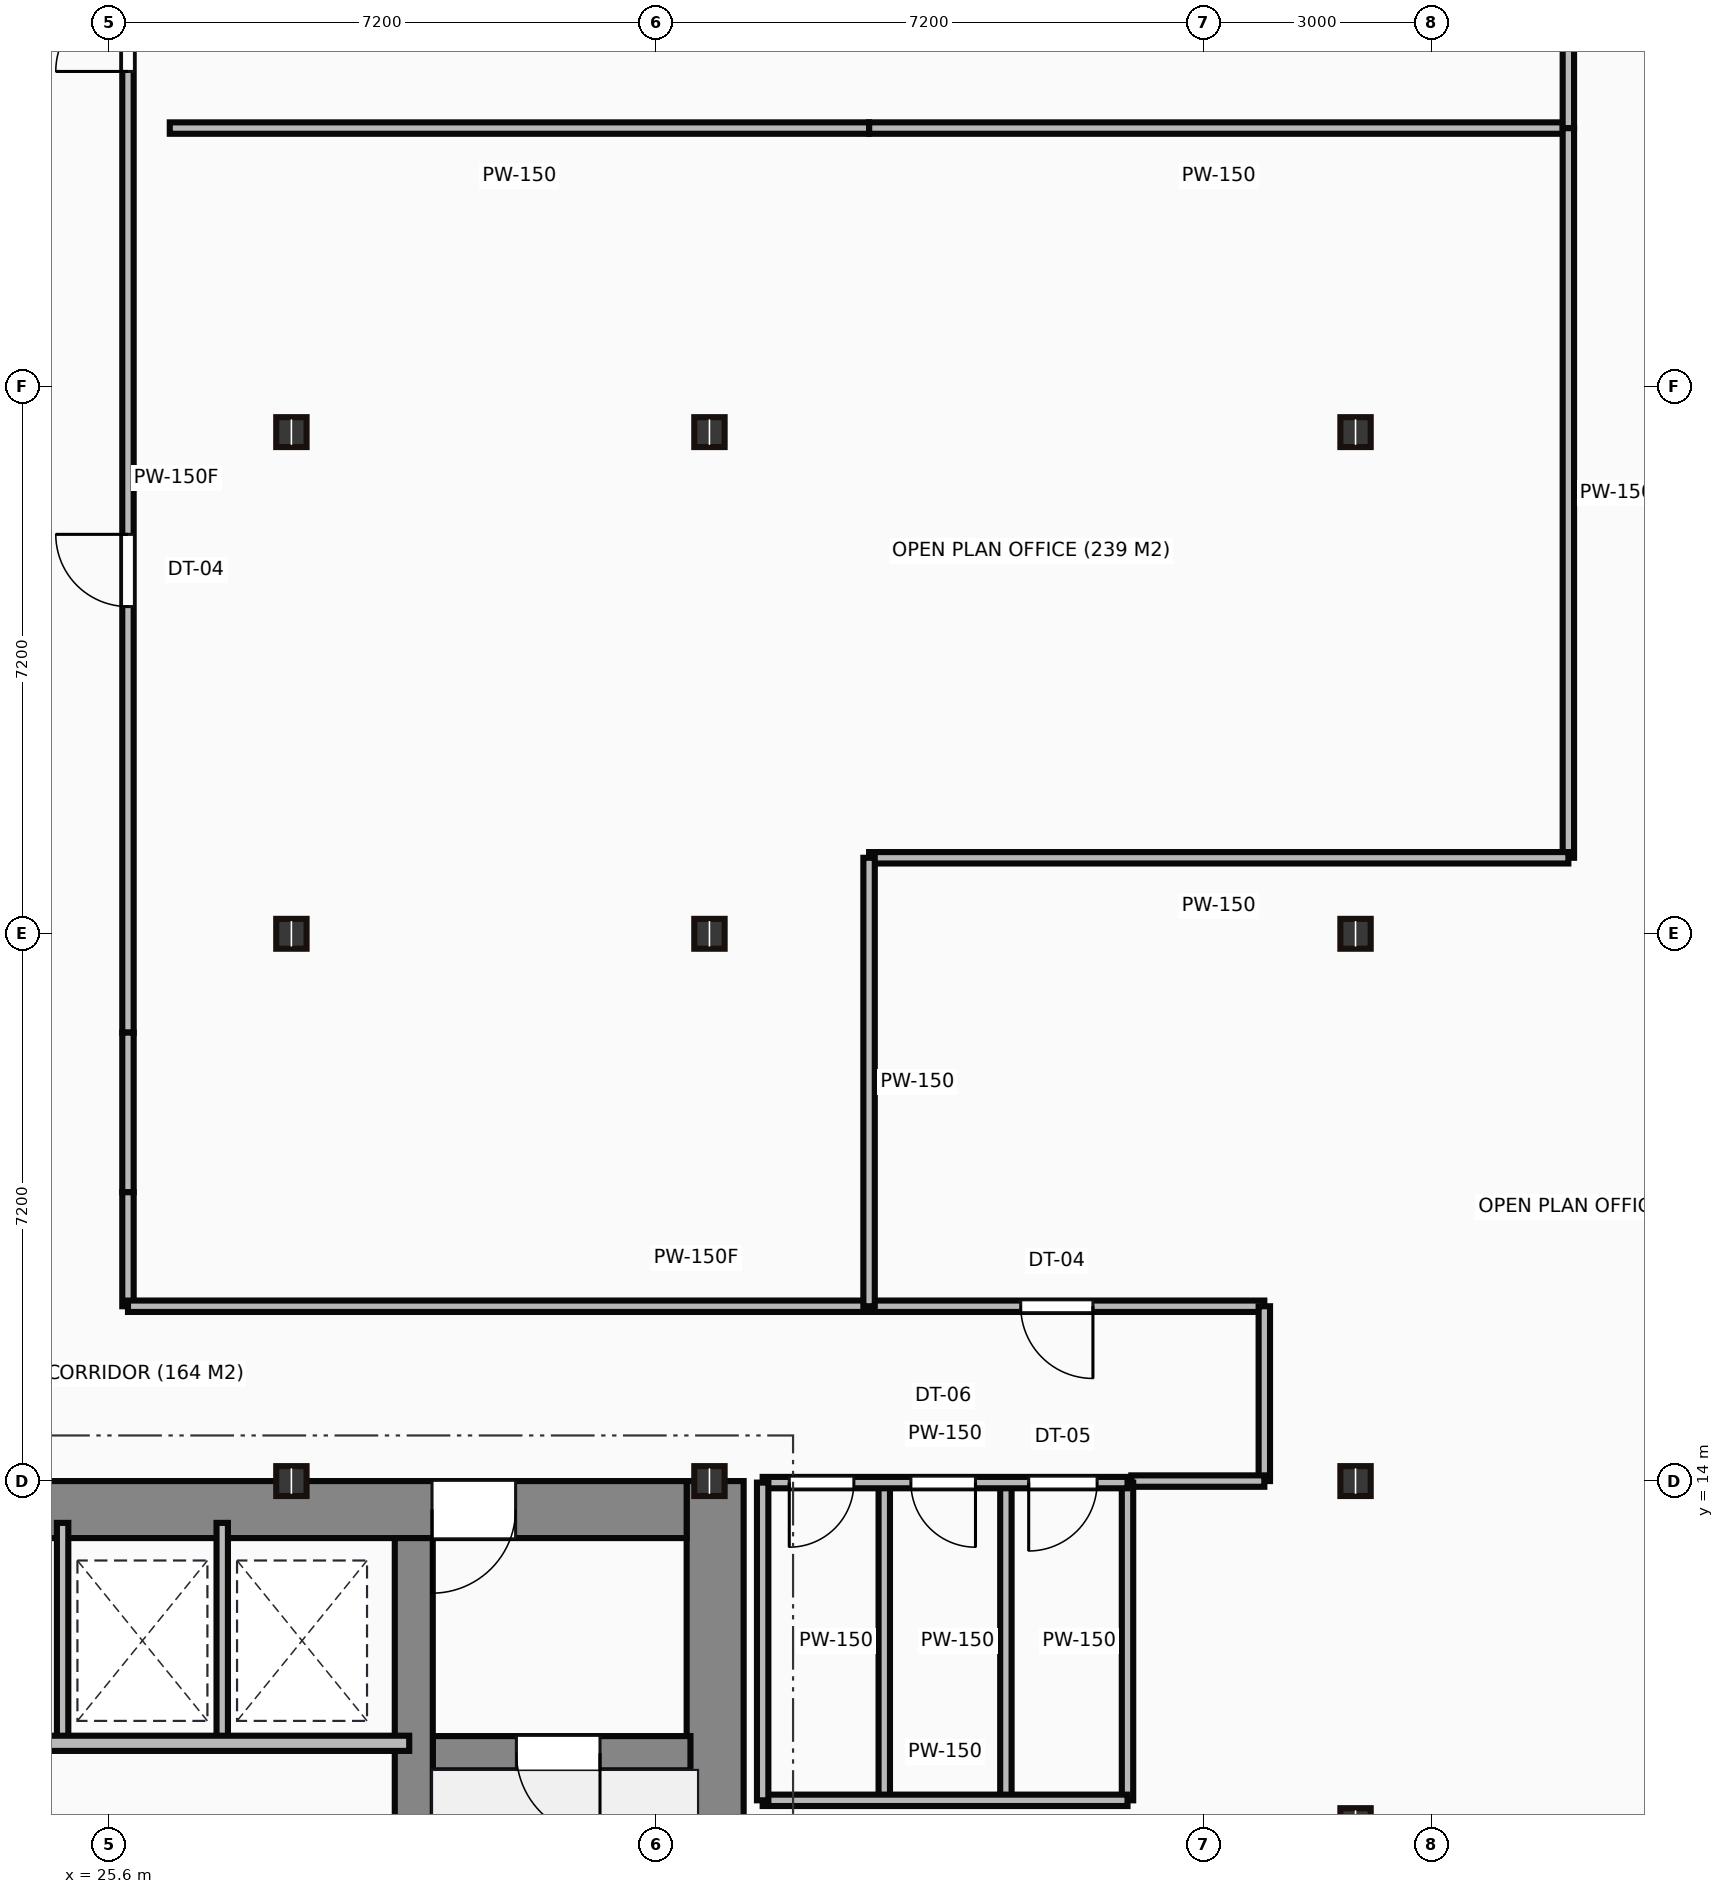
"""IFC4 building model, lengths in metres.
Left out: names, types, materials, properties, quantities, classifications, styles, units other than length and angle.
Written with IfcOpenShell. Run it as: python <this file> out.ifc"""

import sys

from ifc_helpers import new_model, si_unit, direction, frame, frame_2d, origin, origin_2d, place, context, subcontext, project, spatial, rectangle, i_section, extrude, source, transform, mapped, element, fill, save


model = new_model("IFC4")
c1 = context("Model", 3, precision=1e-05, world=origin(), true_north=direction((0.0, 1.0)))
c2 = subcontext(c1, "Body", "Model", "MODEL_VIEW")
j1 = project(units=[si_unit("LENGTHUNIT", "METRE"), si_unit("PLANEANGLEUNIT", "RADIAN")], contexts=[c1])
p1 = place(None, origin())
s1 = spatial("IfcSite", under=j1, at=p1, CompositionType="ELEMENT")
p2 = place(p1, origin())
s2 = spatial("IfcBuilding", under=s1, at=p2, CompositionType="ELEMENT")
p3 = place(p2, frame((0.0, 0.0, 114.2)))
s3 = spatial("IfcBuildingStorey", under=s2, at=p3, CompositionType="ELEMENT", Elevation=114.2)
m1 = source(origin(), c2, "Body", "SweptSolid", [
    extrude(rectangle(XDim=13.1, YDim=0.75, at=frame_2d((6.55, 0.0))), origin(), (0.0, 0.0, 1.0), 3.65),
])
p4 = place(p3, frame((33.575, 0.9, 0.0), z_axis=(0.0, 0.0, 1.0), x_axis=(0.0, 1.0, 0.0)))
e1 = element("IfcWall", 1, at=p4, inside=s3, PredefinedType="SHEAR", context=c2, shape_type="MappedRepresentation", body=[
    mapped(m1, transform((0.0, 0.0, 0.0))),
])
m2 = source(origin(), c2, "Body", "SweptSolid", [
    extrude(rectangle(XDim=12.6, YDim=0.75, at=frame_2d((6.3, 0.0))), origin(), (0.0, 0.0, 1.0), 3.65),
])
p5 = place(p3, frame((20.6, 13.625, 0.0), z_axis=(0.0, 0.0, 1.0), x_axis=(1.0, 0.0, 0.0)))
e2 = element("IfcWall", 2, at=p5, inside=s3, PredefinedType="SHEAR", context=c2, shape_type="MappedRepresentation", body=[
    mapped(m2, transform((0.0, 0.0, 0.0))),
])
p6 = place(p5, frame((9.25, 0.0, 0.0)))
e3 = element("IfcOpeningElement", 3, at=p6, cuts=e2, PredefinedType="OPENING", context=c2, shape_type="SweptSolid", body=[
    extrude(rectangle(XDim=1.1, YDim=2.15, at=frame_2d((0.55, 1.075))), frame((0.0, 0.385, 0.0), z_axis=(0.0, -1.0, 0.0), x_axis=(1.0, 0.0, 0.0)), (0.0, 0.0, 1.0), 0.77),
])
m3 = source(origin(), c2, "Body", "SweptSolid", [
    extrude(rectangle(XDim=12.35, YDim=0.5, at=frame_2d((6.175, 0.0))), origin(), (0.0, 0.0, 1.0), 3.65),
])
p7 = place(p3, frame((29.61, 0.9, 0.0), z_axis=(0.0, 0.0, 1.0), x_axis=(0.0, 1.0, 0.0)))
e4 = element("IfcWall", 4, at=p7, inside=s3, PredefinedType="SHEAR", context=c2, shape_type="MappedRepresentation", body=[
    mapped(m3, transform((0.0, 0.0, 0.0))),
])
m4 = source(origin(), c2, "Body", "SweptSolid", [
    extrude(rectangle(XDim=3.39, YDim=0.45, at=frame_2d((1.695, 0.0))), origin(), (0.0, 0.0, 1.0), 3.65),
])
p8 = place(p3, frame((29.86, 10.42, 0.0), z_axis=(0.0, 0.0, 1.0), x_axis=(1.0, 0.0, 0.0)))
e5 = element("IfcWall", 5, at=p8, inside=s3, PredefinedType="SHEAR", context=c2, shape_type="MappedRepresentation", body=[
    mapped(m4, transform((0.0, 0.0, 0.0))),
])
p9 = place(p8, frame((1.1, 0.0, 0.0)))
e6 = element("IfcOpeningElement", 6, at=p9, cuts=e5, PredefinedType="OPENING", context=c2, shape_type="SweptSolid", body=[
    extrude(rectangle(XDim=1.1, YDim=2.15, at=frame_2d((0.55, 1.075))), frame((0.0, 0.235, 0.0), z_axis=(0.0, -1.0, 0.0), x_axis=(1.0, 0.0, 0.0)), (0.0, 0.0, 1.0), 0.47),
])
m5 = source(origin(), c2, "Body", "SweptSolid", [
    extrude(i_section(OverallWidth=0.399, OverallDepth=0.393, WebThickness=0.023, FlangeThickness=0.037, at=origin_2d()), origin(), (0.0, 0.0, 1.0), 3.65),
])
for number, where, z_axis, x_axis in (
    (7, (28.0, 14.0, 0.0), (0.0, 0.0, 1.0), (1.0, 0.0, 0.0)),
    (8, (28.0, 21.2, 0.0), (0.0, 0.0, 1.0), (1.0, 0.0, 0.0)),
    (9, (28.0, 27.8, 0.0), (0.0, 0.0, 1.0), (1.0, 0.0, 0.0)),
    (10, (33.5, 14.0, 0.0), (0.0, 0.0, 1.0), (1.0, 0.0, 0.0)),
    (11, (33.5, 21.2, 0.0), (0.0, 0.0, 1.0), (1.0, 0.0, 0.0)),
    (12, (33.5, 27.8, 0.0), (0.0, 0.0, 1.0), (1.0, 0.0, 0.0)),
    (13, (42.0, 9.5, 0.0), (0.0, 0.0, 1.0), (1.0, 0.0, 0.0)),
    (14, (42.0, 14.0, 0.0), (0.0, 0.0, 1.0), (1.0, 0.0, 0.0)),
    (15, (42.0, 21.2, 0.0), (0.0, 0.0, 1.0), (1.0, 0.0, 0.0)),
    (16, (42.0, 27.8, 0.0), (0.0, 0.0, 1.0), (1.0, 0.0, 0.0)),
):
    element("IfcColumn", number, at=place(p3, frame(where, z_axis=z_axis, x_axis=x_axis)), inside=s3, PredefinedType="COLUMN", context=c2, shape_type="MappedRepresentation", body=[
        mapped(m5, transform((0.0, 0.0, 0.0))),
    ])
m6 = source(origin(), c2, "Body", "SweptSolid", [
    extrude(rectangle(XDim=8.8, YDim=0.2, at=frame_2d((4.4, 0.0))), origin(), (0.0, 0.0, 1.0), 3.4),
])
p10 = place(p3, frame((20.75, 10.55, 0.0), z_axis=(0.0, 0.0, 1.0), x_axis=(1.0, 0.0, 0.0)))
e17 = element("IfcWall", 17, at=p10, inside=s3, PredefinedType="PARTITIONING", context=c2, shape_type="MappedRepresentation", body=[
    mapped(m6, transform((0.0, 0.0, 0.0))),
])
m7 = source(origin(), c2, "Body", "SweptSolid", [
    extrude(rectangle(XDim=2.85, YDim=0.15, at=frame_2d((1.425, 0.0))), origin(), (0.0, 0.0, 1.0), 3.4),
])
for number, where, z_axis, x_axis in (
    (18, (24.99, 10.6, 0.0), (0.0, 0.0, 1.0), (0.0, 1.0, 0.0)),
    (19, (27.09, 10.6, 0.0), (0.0, 0.0, 1.0), (0.0, 1.0, 0.0)),
):
    element("IfcWall", number, at=place(p3, frame(where, z_axis=z_axis, x_axis=x_axis)), inside=s3, PredefinedType="PARTITIONING", context=c2, shape_type="MappedRepresentation", body=[
        mapped(m7, transform((0.0, 0.0, 0.0))),
    ])
m8 = source(origin(), c2, "Body", "SweptSolid", [
    extrude(rectangle(XDim=4.8, YDim=0.15, at=frame_2d((2.4, 0.0))), origin(), (0.0, 0.0, 1.0), 2.702),
])
p11 = place(p3, frame((34.2, 13.98, 0.0), z_axis=(0.0, 0.0, 1.0), x_axis=(1.0, 0.0, 0.0)))
e20 = element("IfcWall", 20, at=p11, inside=s3, PredefinedType="PARTITIONING", context=c2, shape_type="MappedRepresentation", body=[
    mapped(m8, transform((0.0, 0.0, 0.0))),
])
p12 = place(p11, frame((0.35, 0.0, 0.0)))
e21 = element("IfcOpeningElement", 21, at=p12, cuts=e20, PredefinedType="OPENING", context=c2, shape_type="SweptSolid", body=[
    extrude(rectangle(XDim=0.85, YDim=2.1, at=frame_2d((0.425, 1.05))), frame((0.0, 0.085, 0.0), z_axis=(0.0, -1.0, 0.0), x_axis=(1.0, 0.0, 0.0)), (0.0, 0.0, 1.0), 0.17),
])
p13 = place(p11, frame((1.95, 0.0, 0.0)))
e22 = element("IfcOpeningElement", 22, at=p13, cuts=e20, PredefinedType="OPENING", context=c2, shape_type="SweptSolid", body=[
    extrude(rectangle(XDim=0.85, YDim=2.1, at=frame_2d((0.425, 1.05))), frame((0.0, 0.085, 0.0), z_axis=(0.0, -1.0, 0.0), x_axis=(1.0, 0.0, 0.0)), (0.0, 0.0, 1.0), 0.17),
])
p14 = place(p11, frame((3.5, 0.0, 0.0)))
e23 = element("IfcOpeningElement", 23, at=p14, cuts=e20, PredefinedType="OPENING", context=c2, shape_type="SweptSolid", body=[
    extrude(rectangle(XDim=0.9, YDim=2.1, at=frame_2d((0.45, 1.05))), frame((0.0, 0.085, 0.0), z_axis=(0.0, -1.0, 0.0), x_axis=(1.0, 0.0, 0.0)), (0.0, 0.0, 1.0), 0.17),
])
m9 = source(origin(), c2, "Body", "SweptSolid", [
    extrude(rectangle(XDim=4.8, YDim=0.15, at=frame_2d((2.4, 0.0))), origin(), (0.0, 0.0, 1.0), 3.4),
])
p15 = place(p3, frame((34.2, 9.8, 0.0), z_axis=(0.0, 0.0, 1.0), x_axis=(1.0, 0.0, 0.0)))
e24 = element("IfcWall", 24, at=p15, inside=s3, PredefinedType="PARTITIONING", context=c2, shape_type="MappedRepresentation", body=[
    mapped(m9, transform((0.0, 0.0, 0.0))),
])
m10 = source(origin(), c2, "Body", "SweptSolid", [
    extrude(rectangle(XDim=4.18, YDim=0.15, at=frame_2d((2.09, 0.0))), origin(), (0.0, 0.0, 1.0), 3.4),
])
for number, where, z_axis, x_axis in (
    (25, (39.0, 9.8, 0.0), (0.0, 0.0, 1.0), (0.0, 1.0, 0.0)),
    (26, (34.2, 9.8, 0.0), (0.0, 0.0, 1.0), (0.0, 1.0, 0.0)),
    (27, (35.8, 9.8, 0.0), (0.0, 0.0, 1.0), (0.0, 1.0, 0.0)),
    (28, (37.4, 9.8, 0.0), (0.0, 0.0, 1.0), (0.0, 1.0, 0.0)),
):
    element("IfcWall", number, at=place(p3, frame(where, z_axis=z_axis, x_axis=x_axis)), inside=s3, PredefinedType="PARTITIONING", context=c2, shape_type="MappedRepresentation", body=[
        mapped(m10, transform((0.0, 0.0, 0.0))),
    ])
m11 = source(origin(), c2, "Body", "SweptSolid", [
    extrude(rectangle(XDim=14.6, YDim=0.15, at=frame_2d((7.3, 0.0))), origin(), (0.0, 0.0, 1.0), 3.4),
])
p16 = place(p3, frame((25.85, 34.5, 0.0), z_axis=(0.0, 0.0, 1.0), x_axis=(0.0, -1.0, 0.0)))
e29 = element("IfcWall", 29, at=p16, inside=s3, PredefinedType="PARTITIONING", context=c2, shape_type="MappedRepresentation", body=[
    mapped(m11, transform((0.0, 0.0, 0.0))),
])
p17 = place(p16, frame((1.005, 0.0, 0.0)))
e30 = element("IfcOpeningElement", 30, at=p17, cuts=e29, PredefinedType="OPENING", context=c2, shape_type="SweptSolid", body=[
    extrude(rectangle(XDim=0.95, YDim=2.15, at=frame_2d((0.475, 1.075))), frame((0.0, 0.085, 0.0), z_axis=(0.0, -1.0, 0.0), x_axis=(1.0, 0.0, 0.0)), (0.0, 0.0, 1.0), 0.17),
])
p18 = place(p16, frame((8.045, 0.0, 0.0)))
e31 = element("IfcOpeningElement", 31, at=p18, cuts=e29, PredefinedType="OPENING", context=c2, shape_type="SweptSolid", body=[
    extrude(rectangle(XDim=0.95, YDim=2.15, at=frame_2d((0.475, 1.075))), frame((0.0, 0.085, 0.0), z_axis=(0.0, -1.0, 0.0), x_axis=(1.0, 0.0, 0.0)), (0.0, 0.0, 1.0), 0.17),
])
m12 = source(origin(), c2, "Body", "SweptSolid", [
    extrude(rectangle(XDim=2.1, YDim=0.15, at=frame_2d((1.05, 0.0))), origin(), (0.0, 0.0, 1.0), 3.4),
])
p19 = place(p3, frame((25.85, 19.9, 0.0), z_axis=(0.0, 0.0, 1.0), x_axis=(0.0, -1.0, 0.0)))
e32 = element("IfcWall", 32, at=p19, inside=s3, PredefinedType="PARTITIONING", context=c2, shape_type="MappedRepresentation", body=[
    mapped(m12, transform((0.0, 0.0, 0.0))),
])
m13 = source(origin(), c2, "Body", "SweptSolid", [
    extrude(rectangle(XDim=1.5, YDim=0.15, at=frame_2d((0.75, 0.0))), origin(), (0.0, 0.0, 1.0), 3.4),
])
p20 = place(p3, frame((25.85, 17.8, 0.0), z_axis=(0.0, 0.0, 1.0), x_axis=(0.0, -1.0, 0.0)))
e33 = element("IfcWall", 33, at=p20, inside=s3, PredefinedType="PARTITIONING", context=c2, shape_type="MappedRepresentation", body=[
    mapped(m13, transform((0.0, 0.0, 0.0))),
])
m14 = source(origin(), c2, "Body", "SweptSolid", [
    extrude(rectangle(XDim=14.95, YDim=0.15, at=frame_2d((7.475, 0.0))), origin(), (0.0, 0.0, 1.0), 3.4),
])
p21 = place(p3, frame((25.85, 16.3, 0.0), z_axis=(0.0, 0.0, 1.0), x_axis=(1.0, 0.0, 0.0)))
e34 = element("IfcWall", 34, at=p21, inside=s3, PredefinedType="PARTITIONING", context=c2, shape_type="MappedRepresentation", body=[
    mapped(m14, transform((0.0, 0.0, 0.0))),
])
p22 = place(p21, frame((11.745, 0.0, 0.0)))
e35 = element("IfcOpeningElement", 35, at=p22, cuts=e34, PredefinedType="OPENING", context=c2, shape_type="SweptSolid", body=[
    extrude(rectangle(XDim=0.95, YDim=2.15, at=frame_2d((0.475, 1.075))), frame((0.0, 0.085, 0.0), z_axis=(0.0, -1.0, 0.0), x_axis=(1.0, 0.0, 0.0)), (0.0, 0.0, 1.0), 0.17),
])
m15 = source(origin(), c2, "Body", "SweptSolid", [
    extrude(rectangle(XDim=2.3, YDim=0.15, at=frame_2d((1.15, 0.0))), origin(), (0.0, 0.0, 1.0), 3.4),
])
p23 = place(p3, frame((40.8, 16.3, 0.0), z_axis=(0.0, 0.0, 1.0), x_axis=(0.0, -1.0, 0.0)))
e36 = element("IfcWall", 36, at=p23, inside=s3, PredefinedType="PARTITIONING", context=c2, shape_type="MappedRepresentation", body=[
    mapped(m15, transform((0.0, 0.0, 0.0))),
])
m16 = source(origin(), c2, "Body", "SweptSolid", [
    extrude(rectangle(XDim=1.75, YDim=0.15, at=frame_2d((0.875, 0.0))), origin(), (0.0, 0.0, 1.0), 2.702),
])
p24 = place(p3, frame((40.8, 14.0, 0.0), z_axis=(0.0, 0.0, 1.0), x_axis=(-1.0, 0.0, 0.0)))
e37 = element("IfcWall", 37, at=p24, inside=s3, PredefinedType="PARTITIONING", context=c2, shape_type="MappedRepresentation", body=[
    mapped(m16, transform((0.0, 0.0, 0.0))),
])
m17 = source(origin(), c2, "Body", "SweptSolid", [
    extrude(rectangle(XDim=9.2, YDim=0.15, at=frame_2d((4.6, 0.0))), origin(), (0.0, 0.0, 1.0), 3.4),
])
p25 = place(p3, frame((44.8, 31.8, 0.0), z_axis=(0.0, 0.0, 1.0), x_axis=(-1.0, 0.0, 0.0)))
e38 = element("IfcWall", 38, at=p25, inside=s3, PredefinedType="PARTITIONING", context=c2, shape_type="MappedRepresentation", body=[
    mapped(m17, transform((0.0, 0.0, 0.0))),
])
m18 = source(origin(), c2, "Body", "SweptSolid", [
    extrude(rectangle(XDim=9.2, YDim=0.15, at=frame_2d((4.6, 0.0))), origin(), (0.0, 0.0, 1.0), 3.4),
])
p26 = place(p3, frame((35.6, 31.8, 0.0), z_axis=(0.0, 0.0, 1.0), x_axis=(-1.0, 0.0, 0.0)))
e39 = element("IfcWall", 39, at=p26, inside=s3, PredefinedType="PARTITIONING", context=c2, shape_type="MappedRepresentation", body=[
    mapped(m18, transform((0.0, 0.0, 0.0))),
])
m19 = source(origin(), c2, "Body", "SweptSolid", [
    extrude(rectangle(XDim=9.6, YDim=0.15, at=frame_2d((4.8, 0.0))), origin(), (0.0, 0.0, 1.0), 3.4),
])
p27 = place(p3, frame((44.8, 31.8, 0.0), z_axis=(0.0, 0.0, 1.0), x_axis=(0.0, -1.0, 0.0)))
e40 = element("IfcWall", 40, at=p27, inside=s3, PredefinedType="PARTITIONING", context=c2, shape_type="MappedRepresentation", body=[
    mapped(m19, transform((0.0, 0.0, 0.0))),
])
p28 = place(p3, frame((44.8, 22.2, 0.0), z_axis=(0.0, 0.0, 1.0), x_axis=(-1.0, 0.0, 0.0)))
e41 = element("IfcWall", 41, at=p28, inside=s3, PredefinedType="PARTITIONING", context=c2, shape_type="MappedRepresentation", body=[
    mapped(m17, transform((0.0, 0.0, 0.0))),
])
m20 = source(origin(), c2, "Body", "SweptSolid", [
    extrude(rectangle(XDim=5.9, YDim=0.15, at=frame_2d((2.95, 0.0))), origin(), (0.0, 0.0, 1.0), 3.4),
])
p29 = place(p3, frame((35.6, 22.2, 0.0), z_axis=(0.0, 0.0, 1.0), x_axis=(0.0, -1.0, 0.0)))
e42 = element("IfcWall", 42, at=p29, inside=s3, PredefinedType="PARTITIONING", context=c2, shape_type="MappedRepresentation", body=[
    mapped(m20, transform((0.0, 0.0, 0.0))),
])
m21 = source(origin(), c2, "Body", "SweptSolid", [
    extrude(rectangle(XDim=8.555, YDim=0.15, at=frame_2d((4.277, 0.0))), origin(), (0.0, 0.0, 1.0), 3.4),
])
p30 = place(p3, frame((44.8, 40.355, 0.0), z_axis=(0.0, 0.0, 1.0), x_axis=(0.0, -1.0, 0.0)))
e43 = element("IfcWall", 43, at=p30, inside=s3, PredefinedType="PARTITIONING", context=c2, shape_type="MappedRepresentation", body=[
    mapped(m21, transform((0.0, 0.0, 0.0))),
])
m22 = source(origin(), c2, "Body", "SweptSolid", [
    extrude(rectangle(XDim=1.1, YDim=2.15, at=frame_2d((0.55, 1.075))), frame((0.0, 0.025, 0.0), z_axis=(0.0, -1.0, 0.0), x_axis=(1.0, 0.0, 0.0)), (0.0, 0.0, 1.0), 0.05),
])
p31 = place(p9, frame((1.1, 0.0, 0.0), z_axis=(0.0, 0.0, 1.0), x_axis=(-1.0, 0.0, 0.0)))
e44 = element("IfcDoor", 44, at=p31, inside=s3, OperationType="SINGLE_SWING_RIGHT", PredefinedType="DOOR", context=c2, shape_type="MappedRepresentation", body=[
    mapped(m22, transform((0.0, 0.0, 0.0))),
])
fill(e6, e44)
p32 = place(p6, origin())
e45 = element("IfcDoor", 45, at=p32, inside=s3, OperationType="SINGLE_SWING_LEFT", PredefinedType="DOOR", context=c2, shape_type="MappedRepresentation", body=[
    mapped(m22, transform((0.0, 0.0, 0.0))),
])
fill(e3, e45)
m23 = source(origin(), c2, "Body", "SweptSolid", [
    extrude(rectangle(XDim=0.85, YDim=2.1, at=frame_2d((0.425, 1.05))), frame((0.0, 0.025, 0.0), z_axis=(0.0, -1.0, 0.0), x_axis=(1.0, 0.0, 0.0)), (0.0, 0.0, 1.0), 0.05),
])
p33 = place(p12, frame((0.85, 0.0, 0.0), z_axis=(0.0, 0.0, 1.0), x_axis=(-1.0, 0.0, 0.0)))
e46 = element("IfcDoor", 46, at=p33, inside=s3, OperationType="SINGLE_SWING_LEFT", PredefinedType="DOOR", context=c2, shape_type="MappedRepresentation", body=[
    mapped(m23, transform((0.0, 0.0, 0.0))),
])
fill(e21, e46)
p34 = place(p13, frame((0.85, 0.0, 0.0), z_axis=(0.0, 0.0, 1.0), x_axis=(-1.0, 0.0, 0.0)))
e47 = element("IfcDoor", 47, at=p34, inside=s3, OperationType="SINGLE_SWING_RIGHT", PredefinedType="DOOR", context=c2, shape_type="MappedRepresentation", body=[
    mapped(m23, transform((0.0, 0.0, 0.0))),
])
fill(e22, e47)
m24 = source(origin(), c2, "Body", "SweptSolid", [
    extrude(rectangle(XDim=0.9, YDim=2.1, at=frame_2d((0.45, 1.05))), frame((0.0, 0.025, 0.0), z_axis=(0.0, -1.0, 0.0), x_axis=(1.0, 0.0, 0.0)), (0.0, 0.0, 1.0), 0.05),
])
p35 = place(p14, frame((0.9, 0.0, 0.0), z_axis=(0.0, 0.0, 1.0), x_axis=(-1.0, 0.0, 0.0)))
e48 = element("IfcDoor", 48, at=p35, inside=s3, OperationType="SINGLE_SWING_LEFT", PredefinedType="DOOR", context=c2, shape_type="MappedRepresentation", body=[
    mapped(m24, transform((0.0, 0.0, 0.0))),
])
fill(e23, e48)
m25 = source(origin(), c2, "Body", "SweptSolid", [
    extrude(rectangle(XDim=0.95, YDim=2.15, at=frame_2d((0.475, 1.075))), frame((0.0, 0.025, 0.0), z_axis=(0.0, -1.0, 0.0), x_axis=(1.0, 0.0, 0.0)), (0.0, 0.0, 1.0), 0.05),
])
p36 = place(p17, origin())
e49 = element("IfcDoor", 49, at=p36, inside=s3, OperationType="SINGLE_SWING_RIGHT", PredefinedType="DOOR", context=c2, shape_type="MappedRepresentation", body=[
    mapped(m25, transform((0.0, 0.0, 0.0))),
])
fill(e30, e49)
p37 = place(p18, origin())
e50 = element("IfcDoor", 50, at=p37, inside=s3, OperationType="SINGLE_SWING_LEFT", PredefinedType="DOOR", context=c2, shape_type="MappedRepresentation", body=[
    mapped(m25, transform((0.0, 0.0, 0.0))),
])
fill(e31, e50)
p38 = place(p22, origin())
e51 = element("IfcDoor", 51, at=p38, inside=s3, OperationType="SINGLE_SWING_RIGHT", PredefinedType="DOOR", context=c2, shape_type="MappedRepresentation", body=[
    mapped(m25, transform((0.0, 0.0, 0.0))),
])
fill(e35, e51)
save(model, sys.argv[1])
